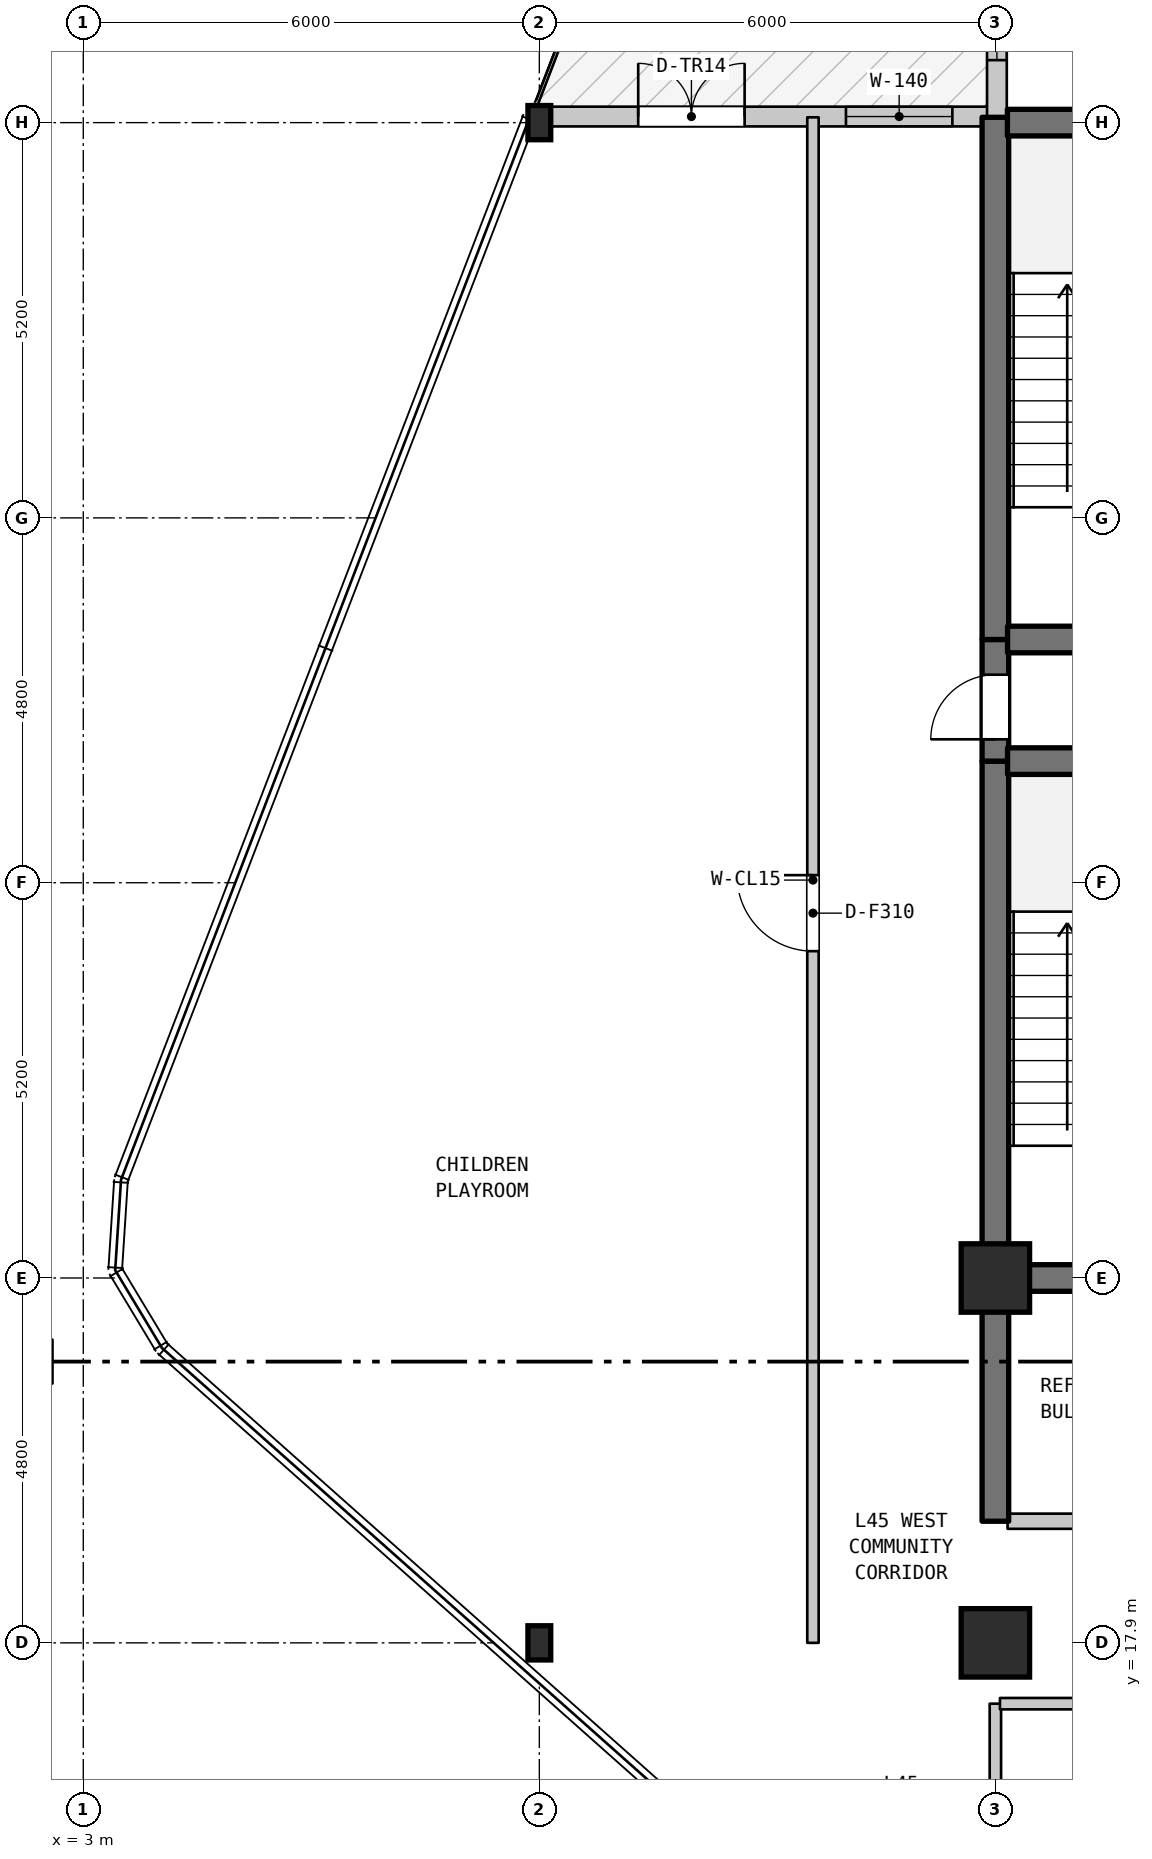
"""IFC4 building model, lengths in metres.
Left out: names, types, materials, properties, quantities, classifications, styles, units other than length and angle.
Written with IfcOpenShell. Run it as: python <this file> out.ifc"""

import sys

from ifc_helpers import new_model, si_unit, direction, frame, frame_2d, origin, origin_2d, place, context, subcontext, project, spatial, rectangle, i_section, extrude, element, fill, save


model = new_model("IFC4")
c1 = context("Model", 3, precision=1e-05, world=origin(), true_north=direction((0.0, 1.0)))
c2 = subcontext(c1, "Body", "Model", "MODEL_VIEW")
j1 = project(units=[si_unit("LENGTHUNIT", "METRE"), si_unit("PLANEANGLEUNIT", "RADIAN")], contexts=[c1])
p1 = place(None, origin())
s1 = spatial("IfcSite", under=j1, at=p1, CompositionType="ELEMENT")
p2 = place(p1, origin())
s2 = spatial("IfcBuilding", under=s1, at=p2, CompositionType="ELEMENT")
p3 = place(p2, frame((0.0, 0.0, 183.9)))
s3 = spatial("IfcBuildingStorey", under=s2, at=p3, CompositionType="ELEMENT", Elevation=183.9)
for number, where, z_axis, x_axis in (
    (1, (9.0, 17.9, 0.0), (0.0, 0.0, 1.0), (1.0, 0.0, 0.0)),
    (2, (9.0, 37.9, 0.0), (0.0, 0.0, 1.0), (1.0, 0.0, 0.0)),
):
    element("IfcColumn", number, at=place(p3, frame(where, z_axis=z_axis, x_axis=x_axis)), inside=s3, PredefinedType="COLUMN", context=c2, shape_type="SweptSolid", body=[
        extrude(i_section(OverallWidth=0.3, OverallDepth=0.45, WebThickness=0.014, FlangeThickness=0.026, FilletRadius=0.027, at=origin_2d()), origin(), (0.0, 0.0, 1.0), 4.5),
    ])
for number, where, z_axis, x_axis in (
    (3, (15.0, 17.9, 0.0), (0.0, 0.0, 1.0), (1.0, 0.0, 0.0)),
    (4, (15.0, 22.7, 0.0), (0.0, 0.0, 1.0), (1.0, 0.0, 0.0)),
):
    element("IfcColumn", number, at=place(p3, frame(where, z_axis=z_axis, x_axis=x_axis)), inside=s3, PredefinedType="COLUMN", context=c2, shape_type="SweptSolid", body=[
        extrude(rectangle(XDim=0.9, YDim=0.9, at=origin_2d()), origin(), (0.0, 0.0, 1.0), 4.5),
    ])
p4 = place(p3, frame((8.877, 37.98, 0.0), z_axis=(0.0, 0.0, 1.0), x_axis=(1.0, 0.0, 0.0)))
e5 = element("IfcWall", 5, at=p4, inside=s3, PredefinedType="STANDARD", context=c2, shape_type="SweptSolid", body=[
    extrude(rectangle(XDim=6.143, YDim=0.26, at=frame_2d((3.072, 0.0))), origin(), (0.0, 0.0, 1.0), 3.89),
])
p5 = place(p4, frame((1.424, 0.0, 0.0)))
e6 = element("IfcOpeningElement", 6, at=p5, cuts=e5, PredefinedType="OPENING", context=c2, shape_type="SweptSolid", body=[
    extrude(rectangle(XDim=1.4, YDim=2.2, at=frame_2d((0.7, 1.1))), frame((0.0, 0.14, 0.0), z_axis=(0.0, -1.0, 0.0), x_axis=(1.0, 0.0, 0.0)), (0.0, 0.0, 1.0), 0.28),
])
p6 = place(p4, frame((4.157, 0.0, 0.9)))
e7 = element("IfcOpeningElement", 7, at=p6, cuts=e5, PredefinedType="OPENING", context=c2, shape_type="SweptSolid", body=[
    extrude(rectangle(XDim=1.4, YDim=1.85, at=frame_2d((0.7, 0.925))), frame((0.0, 0.14, 0.0), z_axis=(0.0, -1.0, 0.0), x_axis=(1.0, 0.0, 0.0)), (0.0, 0.0, 1.0), 0.28),
])
p7 = place(p3, frame((15.02, 37.98, 0.0), z_axis=(0.0, 0.0, 1.0), x_axis=(0.0, 1.0, 0.0)))
e8 = element("IfcWall", 8, at=p7, inside=s3, PredefinedType="STANDARD", context=c2, shape_type="SweptSolid", body=[
    extrude(rectangle(XDim=15.276, YDim=0.26, at=frame_2d((7.638, 0.0))), origin(), (0.0, 0.0, 1.0), 4.19),
])
p8 = place(p7, frame((0.742, 0.0, 0.85)))
e9 = element("IfcOpeningElement", 9, at=p8, cuts=e8, PredefinedType="OPENING", context=c2, shape_type="SweptSolid", body=[
    extrude(rectangle(XDim=1.3, YDim=1.9, at=frame_2d((0.65, 0.95))), frame((0.0, 0.14, 0.0), z_axis=(0.0, -1.0, 0.0), x_axis=(1.0, 0.0, 0.0)), (0.0, 0.0, 1.0), 0.28),
])
p9 = place(p7, frame((5.276, 0.0, 0.85)))
e10 = element("IfcOpeningElement", 10, at=p9, cuts=e8, PredefinedType="OPENING", context=c2, shape_type="SweptSolid", body=[
    extrude(rectangle(XDim=1.3, YDim=1.9, at=frame_2d((0.65, 0.95))), frame((0.0, 0.14, 0.0), z_axis=(0.0, -1.0, 0.0), x_axis=(1.0, 0.0, 0.0)), (0.0, 0.0, 1.0), 0.28),
])
p10 = place(p7, frame((8.96, 0.0, 0.85)))
e11 = element("IfcOpeningElement", 11, at=p10, cuts=e8, PredefinedType="OPENING", context=c2, shape_type="SweptSolid", body=[
    extrude(rectangle(XDim=1.3, YDim=1.9, at=frame_2d((0.65, 0.95))), frame((0.0, 0.14, 0.0), z_axis=(0.0, -1.0, 0.0), x_axis=(1.0, 0.0, 0.0)), (0.0, 0.0, 1.0), 0.28),
])
p11 = place(p7, frame((12.644, 0.0, 0.85)))
e12 = element("IfcOpeningElement", 12, at=p11, cuts=e8, PredefinedType="OPENING", context=c2, shape_type="SweptSolid", body=[
    extrude(rectangle(XDim=1.3, YDim=1.9, at=frame_2d((0.65, 0.95))), frame((0.0, 0.14, 0.0), z_axis=(0.0, -1.0, 0.0), x_axis=(1.0, 0.0, 0.0)), (0.0, 0.0, 1.0), 0.28),
])
p12 = place(p3, frame((12.6, 17.9, 0.0), z_axis=(0.0, 0.0, 1.0), x_axis=(0.0, 1.0, 0.0)))
e13 = element("IfcWall", 13, at=p12, inside=s3, PredefinedType="STANDARD", context=c2, shape_type="SweptSolid", body=[
    extrude(rectangle(XDim=20.07, YDim=0.15, at=frame_2d((10.035, 0.0))), origin(), (0.0, 0.0, 1.0), 4.19),
])
p13 = place(p12, frame((9.1, 0.0, 0.0)))
e14 = element("IfcOpeningElement", 14, at=p13, cuts=e13, PredefinedType="OPENING", context=c2, shape_type="SweptSolid", body=[
    extrude(rectangle(XDim=1.0, YDim=2.15, at=frame_2d((0.5, 1.075))), frame((0.0, 0.085, 0.0), z_axis=(0.0, -1.0, 0.0), x_axis=(1.0, 0.0, 0.0)), (0.0, 0.0, 1.0), 0.17),
])
p14 = place(p3, frame((15.0, 13.0, 0.0), z_axis=(0.0, 0.0, 1.0), x_axis=(0.0, 1.0, 0.0)))
e15 = element("IfcWall", 15, at=p14, inside=s3, PredefinedType="STANDARD", context=c2, shape_type="SweptSolid", body=[
    extrude(rectangle(XDim=4.1, YDim=0.15, at=frame_2d((2.05, 0.0))), origin(), (0.0, 0.0, 1.0), 3.79),
])
p15 = place(p3, frame((15.0, 19.5, 0.0), z_axis=(0.0, 0.0, 1.0), x_axis=(0.0, 1.0, 0.0)))
e16 = element("IfcWall", 16, at=p15, inside=s3, PredefinedType="SHEAR", context=c2, shape_type="SweptSolid", body=[
    extrude(rectangle(XDim=3.2, YDim=0.35, at=frame_2d((1.6, 0.0))), origin(), (0.0, 0.0, 1.0), 4.19),
])
p16 = place(p3, frame((15.0, 22.7, 0.0), z_axis=(0.0, 0.0, 1.0), x_axis=(0.0, 1.0, 0.0)))
e17 = element("IfcWall", 17, at=p16, inside=s3, PredefinedType="SHEAR", context=c2, shape_type="SweptSolid", body=[
    extrude(rectangle(XDim=6.8, YDim=0.35, at=frame_2d((3.4, 0.0))), origin(), (0.0, 0.0, 1.0), 4.19),
])
p17 = place(p3, frame((15.0, 29.5, 0.0), z_axis=(0.0, 0.0, 1.0), x_axis=(0.0, 1.0, 0.0)))
e18 = element("IfcWall", 18, at=p17, inside=s3, PredefinedType="SHEAR", context=c2, shape_type="SweptSolid", body=[
    extrude(rectangle(XDim=1.6, YDim=0.35, at=frame_2d((0.8, 0.0))), origin(), (0.0, 0.0, 1.0), 4.19),
])
p18 = place(p17, frame((0.287, 0.0, 0.0)))
e19 = element("IfcOpeningElement", 19, at=p18, cuts=e18, PredefinedType="OPENING", context=c2, shape_type="SweptSolid", body=[
    extrude(rectangle(XDim=0.85, YDim=2.1, at=frame_2d((0.425, 1.05))), frame((0.0, 0.185, 0.0), z_axis=(0.0, -1.0, 0.0), x_axis=(1.0, 0.0, 0.0)), (0.0, 0.0, 1.0), 0.37),
])
p19 = place(p3, frame((15.0, 31.1, 0.0), z_axis=(0.0, 0.0, 1.0), x_axis=(0.0, 1.0, 0.0)))
e20 = element("IfcWall", 20, at=p19, inside=s3, PredefinedType="SHEAR", context=c2, shape_type="SweptSolid", body=[
    extrude(rectangle(XDim=6.87, YDim=0.35, at=frame_2d((3.435, 0.0))), origin(), (0.0, 0.0, 1.0), 4.19),
])
p20 = place(p3, frame((15.06, 17.1, 0.0), z_axis=(0.0, 0.0, 1.0), x_axis=(1.0, 0.0, 0.0)))
e21 = element("IfcWall", 21, at=p20, inside=s3, PredefinedType="STANDARD", context=c2, shape_type="SweptSolid", body=[
    extrude(rectangle(XDim=8.295, YDim=0.15, at=frame_2d((4.147, 0.0))), origin(), (0.0, 0.0, 1.0), 4.19),
])
p21 = place(p20, frame((1.595, 0.0, 0.0)))
e22 = element("IfcOpeningElement", 22, at=p21, cuts=e21, PredefinedType="OPENING", context=c2, shape_type="SweptSolid", body=[
    extrude(rectangle(XDim=0.9, YDim=2.1, at=frame_2d((0.45, 1.05))), frame((0.0, 0.085, 0.0), z_axis=(0.0, -1.0, 0.0), x_axis=(1.0, 0.0, 0.0)), (0.0, 0.0, 1.0), 0.17),
])
p22 = place(p20, frame((5.645, 0.0, 0.0)))
e23 = element("IfcOpeningElement", 23, at=p22, cuts=e21, PredefinedType="OPENING", context=c2, shape_type="SweptSolid", body=[
    extrude(rectangle(XDim=0.9, YDim=2.1, at=frame_2d((0.45, 1.05))), frame((0.0, 0.085, 0.0), z_axis=(0.0, -1.0, 0.0), x_axis=(1.0, 0.0, 0.0)), (0.0, 0.0, 1.0), 0.17),
])
p23 = place(p3, frame((15.16, 19.5, 0.0), z_axis=(0.0, 0.0, 1.0), x_axis=(1.0, 0.0, 0.0)))
e24 = element("IfcWall", 24, at=p23, inside=s3, PredefinedType="STANDARD", context=c2, shape_type="SweptSolid", body=[
    extrude(rectangle(XDim=3.68, YDim=0.2, at=frame_2d((1.84, 0.0))), origin(), (0.0, 0.0, 1.0), 4.19),
])
p24 = place(p23, frame((1.39, 0.0, 0.0)))
e25 = element("IfcOpeningElement", 25, at=p24, cuts=e24, PredefinedType="OPENING", context=c2, shape_type="SweptSolid", body=[
    extrude(rectangle(XDim=0.9, YDim=2.15, at=frame_2d((0.45, 1.075))), frame((0.0, 0.11, 0.0), z_axis=(0.0, -1.0, 0.0), x_axis=(1.0, 0.0, 0.0)), (0.0, 0.0, 1.0), 0.22),
])
for number, where, z_axis, x_axis in (
    (26, (15.16, 22.7, 0.0), (0.0, 0.0, 1.0), (1.0, 0.0, 0.0)),
    (27, (15.16, 29.5, 0.0), (0.0, 0.0, 1.0), (1.0, 0.0, 0.0)),
    (28, (15.16, 31.1, 0.0), (0.0, 0.0, 1.0), (1.0, 0.0, 0.0)),
):
    element("IfcWall", number, at=place(p3, frame(where, z_axis=z_axis, x_axis=x_axis)), inside=s3, PredefinedType="SHEAR", context=c2, shape_type="SweptSolid", body=[
        extrude(rectangle(XDim=3.68, YDim=0.35, at=frame_2d((1.84, 0.0))), origin(), (0.0, 0.0, 1.0), 4.19),
    ])
p25 = place(p3, frame((15.158, 37.9, 0.0), z_axis=(0.0, 0.0, 1.0), x_axis=(1.0, 0.0, 0.0)))
e29 = element("IfcWall", 29, at=p25, inside=s3, PredefinedType="SHEAR", context=c2, shape_type="SweptSolid", body=[
    extrude(rectangle(XDim=3.682, YDim=0.35, at=frame_2d((1.841, 0.0))), origin(), (0.0, 0.0, 1.0), 4.19),
])
p26 = place(p5, origin())
e30 = element("IfcDoor", 30, at=p26, inside=s3, OperationType="DOUBLE_DOOR_SINGLE_SWING", PredefinedType="DOOR", context=c2, shape_type="SweptSolid", body=[
    extrude(rectangle(XDim=1.4, YDim=2.2, at=frame_2d((0.7, 1.1))), frame((0.0, 0.025, 0.0), z_axis=(0.0, -1.0, 0.0), x_axis=(1.0, 0.0, 0.0)), (0.0, 0.0, 1.0), 0.05),
])
fill(e6, e30)
p27 = place(p6, origin())
e31 = element("IfcWindow", 31, at=p27, inside=s3, PartitioningType="SINGLE_PANEL", PredefinedType="WINDOW", context=c2, shape_type="SweptSolid", body=[
    extrude(rectangle(XDim=1.4, YDim=1.85, at=frame_2d((0.7, 0.925))), frame((0.0, 0.03, 0.0), z_axis=(0.0, -1.0, 0.0), x_axis=(1.0, 0.0, 0.0)), (0.0, 0.0, 1.0), 0.06),
])
fill(e7, e31)
p28 = place(p8, origin())
e32 = element("IfcWindow", 32, at=p28, inside=s3, PartitioningType="SINGLE_PANEL", PredefinedType="WINDOW", context=c2, shape_type="SweptSolid", body=[
    extrude(rectangle(XDim=1.3, YDim=1.9, at=frame_2d((0.65, 0.95))), frame((0.0, 0.03, 0.0), z_axis=(0.0, -1.0, 0.0), x_axis=(1.0, 0.0, 0.0)), (0.0, 0.0, 1.0), 0.06),
])
fill(e9, e32)
p29 = place(p13, origin())
e33 = element("IfcDoor", 33, at=p29, inside=s3, OperationType="SINGLE_SWING_RIGHT", PredefinedType="DOOR", context=c2, shape_type="SweptSolid", body=[
    extrude(rectangle(XDim=1.0, YDim=2.15, at=frame_2d((0.5, 1.075))), frame((0.0, 0.025, 0.0), z_axis=(0.0, -1.0, 0.0), x_axis=(1.0, 0.0, 0.0)), (0.0, 0.0, 1.0), 0.05),
])
fill(e14, e33)
p30 = place(p18, origin())
e34 = element("IfcDoor", 34, at=p30, inside=s3, OperationType="SINGLE_SWING_LEFT", PredefinedType="DOOR", context=c2, shape_type="SweptSolid", body=[
    extrude(rectangle(XDim=0.85, YDim=2.1, at=frame_2d((0.425, 1.05))), frame((0.0, 0.025, 0.0), z_axis=(0.0, -1.0, 0.0), x_axis=(1.0, 0.0, 0.0)), (0.0, 0.0, 1.0), 0.05),
])
fill(e19, e34)
save(model, sys.argv[1])
